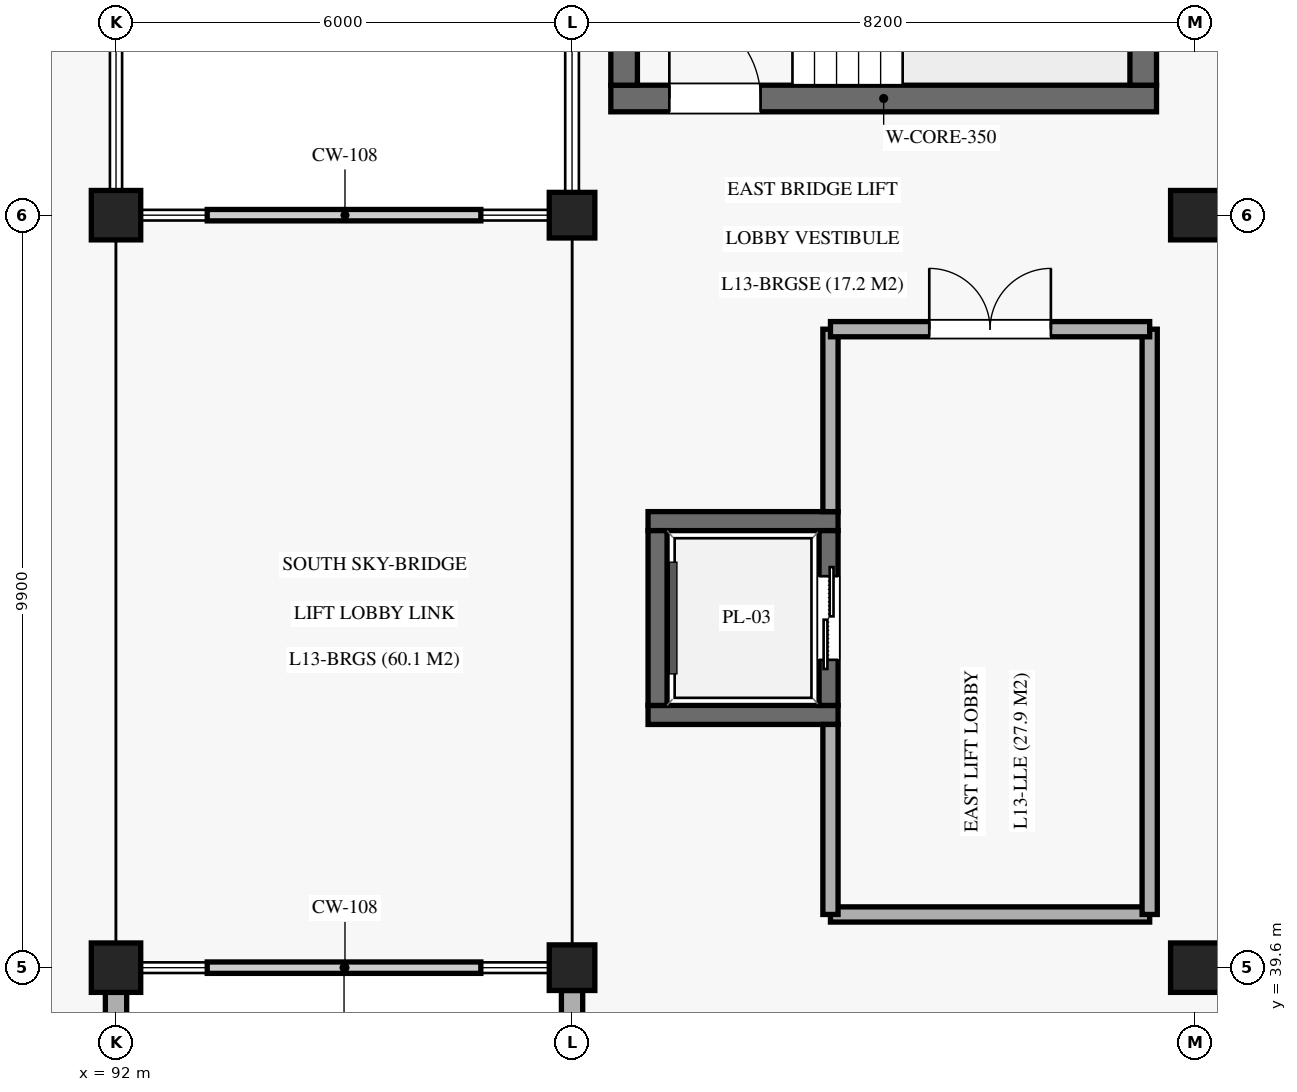
"""IFC4 building model, lengths in metres.
Left out: names, types, materials, properties, quantities, classifications, styles, units other than length and angle.
Written with IfcOpenShell. Run it as: python <this file> out.ifc"""

import sys

from ifc_helpers import new_model, si_unit, direction, frame, frame_2d, origin, origin_2d, place, context, subcontext, project, spatial, rectangle, extrude, element, fill, save


model = new_model("IFC4")
c1 = context("Model", 3, precision=1e-05, world=origin(), true_north=direction((0.0, 1.0)))
c2 = subcontext(c1, "Body", "Model", "MODEL_VIEW")
j1 = project(units=[si_unit("LENGTHUNIT", "METRE"), si_unit("PLANEANGLEUNIT", "RADIAN")], contexts=[c1])
p1 = place(None, origin())
s1 = spatial("IfcSite", under=j1, at=p1, CompositionType="ELEMENT")
p2 = place(p1, origin())
s2 = spatial("IfcBuilding", under=s1, at=p2, CompositionType="ELEMENT")
p3 = place(p2, frame((0.0, 0.0, 66.3)))
s3 = spatial("IfcBuildingStorey", under=s2, at=p3, CompositionType="ELEMENT", Elevation=66.3)
for number, where, z_axis, x_axis in (
    (1, (92.0, 39.6, 0.0), (0.0, 0.0, 1.0), (1.0, 0.0, 0.0)),
    (2, (92.0, 49.5, 0.0), (0.0, 0.0, 1.0), (1.0, 0.0, 0.0)),
):
    element("IfcColumn", number, at=place(p3, frame(where, z_axis=z_axis, x_axis=x_axis)), inside=s3, PredefinedType="COLUMN", context=c2, shape_type="SweptSolid", body=[
        extrude(rectangle(XDim=0.65, YDim=0.65, at=origin_2d()), origin(), (0.0, 0.0, 1.0), 4.08),
    ])
for number, where, z_axis, x_axis in (
    (3, (98.0, 39.6, 0.0), (0.0, 0.0, 1.0), (1.0, 0.0, 0.0)),
    (4, (98.0, 49.5, 0.0), (0.0, 0.0, 1.0), (1.0, 0.0, 0.0)),
):
    element("IfcColumn", number, at=place(p3, frame(where, z_axis=z_axis, x_axis=x_axis)), inside=s3, PredefinedType="COLUMN", context=c2, shape_type="SweptSolid", body=[
        extrude(rectangle(XDim=0.6, YDim=0.6, at=origin_2d()), origin(), (0.0, 0.0, 1.0), 4.08),
    ])
for number, where, z_axis, x_axis in (
    (5, (106.2, 39.6, 0.0), (0.0, 0.0, 1.0), (1.0, 0.0, 0.0)),
    (6, (106.2, 49.5, 0.0), (0.0, 0.0, 1.0), (1.0, 0.0, 0.0)),
):
    element("IfcColumn", number, at=place(p3, frame(where, z_axis=z_axis, x_axis=x_axis)), inside=s3, PredefinedType="COLUMN", context=c2, shape_type="SweptSolid", body=[
        extrude(rectangle(XDim=0.65, YDim=0.65, at=origin_2d()), origin(), (0.0, 0.0, 1.0), 4.08),
    ])
p4 = place(p3, frame((92.0, 30.025, 0.0), z_axis=(0.0, 0.0, 1.0), x_axis=(0.0, 1.0, 0.0)))
e7 = element("IfcWall", 7, at=p4, inside=s3, PredefinedType="SOLIDWALL", context=c2, shape_type="SweptSolid", body=[
    extrude(rectangle(XDim=9.25, YDim=0.28, at=frame_2d((4.625, 0.0))), origin(), (0.0, 0.0, 1.0), 3.08),
])
p5 = place(p4, frame((3.625, 0.0, 1.15)))
e8 = element("IfcOpeningElement", 8, at=p5, cuts=e7, PredefinedType="OPENING", context=c2, shape_type="SweptSolid", body=[
    extrude(rectangle(XDim=1.2, YDim=1.5, at=frame_2d((0.6, 0.75))), frame((0.0, 0.15, 0.0), z_axis=(0.0, -1.0, 0.0), x_axis=(1.0, 0.0, 0.0)), (0.0, 0.0, 1.0), 0.3),
])
p6 = place(p3, frame((98.0, 30.0, 0.0), z_axis=(0.0, 0.0, 1.0), x_axis=(0.0, 1.0, 0.0)))
e9 = element("IfcWall", 9, at=p6, inside=s3, PredefinedType="SOLIDWALL", context=c2, shape_type="SweptSolid", body=[
    extrude(rectangle(XDim=9.3, YDim=0.28, at=frame_2d((4.65, 0.0))), origin(), (0.0, 0.0, 1.0), 3.08),
])
p7 = place(p6, frame((3.65, 0.0, 1.15)))
e10 = element("IfcOpeningElement", 10, at=p7, cuts=e9, PredefinedType="OPENING", context=c2, shape_type="SweptSolid", body=[
    extrude(rectangle(XDim=1.9, YDim=1.45, at=frame_2d((0.95, 0.725))), frame((0.0, 0.15, 0.0), z_axis=(0.0, -1.0, 0.0), x_axis=(1.0, 0.0, 0.0)), (0.0, 0.0, 1.0), 0.3),
])
p8 = place(p3, frame((98.51, 51.035, 0.0), z_axis=(0.0, 0.0, 1.0), x_axis=(1.0, 0.0, 0.0)))
e11 = element("IfcWall", 11, at=p8, inside=s3, PredefinedType="SHEAR", context=c2, shape_type="SweptSolid", body=[
    extrude(rectangle(XDim=7.18, YDim=0.35, at=frame_2d((3.59, 0.0))), origin(), (0.0, 0.0, 1.0), 3.83),
])
p9 = place(p8, frame((0.77, 0.0, 0.0)))
e12 = element("IfcOpeningElement", 12, at=p9, cuts=e11, PredefinedType="OPENING", context=c2, shape_type="SweptSolid", body=[
    extrude(rectangle(XDim=1.2, YDim=2.2, at=frame_2d((0.6, 1.1))), frame((0.0, 0.185, 0.0), z_axis=(0.0, -1.0, 0.0), x_axis=(1.0, 0.0, 0.0)), (0.0, 0.0, 1.0), 0.37),
])
for number, where, z_axis, x_axis in (
    (13, (98.685, 51.21, 0.0), (0.0, 0.0, 1.0), (0.0, 1.0, 0.0)),
    (14, (105.515, 51.21, 0.0), (0.0, 0.0, 1.0), (0.0, 1.0, 0.0)),
):
    element("IfcWall", number, at=place(p3, frame(where, z_axis=z_axis, x_axis=x_axis)), inside=s3, PredefinedType="SHEAR", context=c2, shape_type="SweptSolid", body=[
        extrude(rectangle(XDim=6.48, YDim=0.35, at=frame_2d((3.24, 0.0))), origin(), (0.0, 0.0, 1.0), 3.83),
    ])
for number, where, z_axis, x_axis in (
    (15, (99.0, 42.925, 0.0), (0.0, 0.0, 1.0), (1.0, 0.0, 0.0)),
    (16, (99.0, 45.475, 0.0), (0.0, 0.0, 1.0), (1.0, 0.0, 0.0)),
):
    element("IfcWall", number, at=place(p3, frame(where, z_axis=z_axis, x_axis=x_axis)), inside=s3, PredefinedType="SOLIDWALL", context=c2, shape_type="SweptSolid", body=[
        extrude(rectangle(XDim=2.5, YDim=0.25, at=frame_2d((1.25, 0.0))), origin(), (0.0, 0.0, 1.0), 3.81),
    ])
p10 = place(p3, frame((99.125, 43.05, 0.0), z_axis=(0.0, 0.0, 1.0), x_axis=(0.0, 1.0, 0.0)))
e17 = element("IfcWall", 17, at=p10, inside=s3, PredefinedType="SOLIDWALL", context=c2, shape_type="SweptSolid", body=[
    extrude(rectangle(XDim=2.3, YDim=0.25, at=frame_2d((1.15, 0.0))), origin(), (0.0, 0.0, 1.0), 3.81),
])
p11 = place(p3, frame((101.375, 43.05, 0.0), z_axis=(0.0, 0.0, 1.0), x_axis=(0.0, 1.0, 0.0)))
e18 = element("IfcWall", 18, at=p11, inside=s3, PredefinedType="SOLIDWALL", context=c2, shape_type="SweptSolid", body=[
    extrude(rectangle(XDim=2.3, YDim=0.25, at=frame_2d((1.15, 0.0))), origin(), (0.0, 0.0, 1.0), 3.81),
])
p12 = place(p11, frame((0.6, 0.0, 0.0)))
e19 = element("IfcOpeningElement", 19, at=p12, cuts=e18, PredefinedType="OPENING", context=c2, shape_type="SweptSolid", body=[
    extrude(rectangle(XDim=1.1, YDim=2.2, at=frame_2d((0.55, 1.1))), frame((0.0, 0.135, 0.0), z_axis=(0.0, -1.0, 0.0), x_axis=(1.0, 0.0, 0.0)), (0.0, 0.0, 1.0), 0.27),
])
p13 = place(p3, frame((101.4, 40.3, 0.0), z_axis=(0.0, 0.0, 1.0), x_axis=(1.0, 0.0, 0.0)))
e20 = element("IfcWall", 20, at=p13, inside=s3, PredefinedType="SOLIDWALL", context=c2, shape_type="SweptSolid", body=[
    extrude(rectangle(XDim=4.2, YDim=0.2, at=frame_2d((2.1, 0.0))), origin(), (0.0, 0.0, 1.0), 2.95),
])
p14 = place(p3, frame((101.4, 40.3, 0.0), z_axis=(0.0, 0.0, 1.0), x_axis=(0.0, 1.0, 0.0)))
e21 = element("IfcWall", 21, at=p14, inside=s3, PredefinedType="SOLIDWALL", context=c2, shape_type="SweptSolid", body=[
    extrude(rectangle(XDim=2.5, YDim=0.2, at=frame_2d((1.25, 0.0))), origin(), (0.0, 0.0, 1.0), 2.95),
])
p15 = place(p3, frame((101.4, 45.6, 0.0), z_axis=(0.0, 0.0, 1.0), x_axis=(0.0, 1.0, 0.0)))
e22 = element("IfcWall", 22, at=p15, inside=s3, PredefinedType="SOLIDWALL", context=c2, shape_type="SweptSolid", body=[
    extrude(rectangle(XDim=2.4, YDim=0.2, at=frame_2d((1.2, 0.0))), origin(), (0.0, 0.0, 1.0), 2.95),
])
p16 = place(p3, frame((105.6, 40.3, 0.0), z_axis=(0.0, 0.0, 1.0), x_axis=(0.0, 1.0, 0.0)))
e23 = element("IfcWall", 23, at=p16, inside=s3, PredefinedType="SOLIDWALL", context=c2, shape_type="SweptSolid", body=[
    extrude(rectangle(XDim=7.7, YDim=0.2, at=frame_2d((3.85, 0.0))), origin(), (0.0, 0.0, 1.0), 2.95),
])
p17 = place(p3, frame((101.4, 48.0, 0.0), z_axis=(0.0, 0.0, 1.0), x_axis=(1.0, 0.0, 0.0)))
e24 = element("IfcWall", 24, at=p17, inside=s3, PredefinedType="SOLIDWALL", context=c2, shape_type="SweptSolid", body=[
    extrude(rectangle(XDim=4.2, YDim=0.2, at=frame_2d((2.1, 0.0))), origin(), (0.0, 0.0, 1.0), 2.95),
])
p18 = place(p17, frame((1.3, 0.0, 0.0)))
e25 = element("IfcOpeningElement", 25, at=p18, cuts=e24, PredefinedType="OPENING", context=c2, shape_type="SweptSolid", body=[
    extrude(rectangle(XDim=1.6, YDim=2.2, at=frame_2d((0.8, 1.1))), frame((0.0, 0.11, 0.0), z_axis=(0.0, -1.0, 0.0), x_axis=(1.0, 0.0, 0.0)), (0.0, 0.0, 1.0), 0.22),
])
p19 = place(p9, origin())
e26 = element("IfcDoor", 26, at=p19, inside=s3, OperationType="SINGLE_SWING_LEFT", PredefinedType="DOOR", context=c2, shape_type="SweptSolid", body=[
    extrude(rectangle(XDim=1.2, YDim=2.2, at=frame_2d((0.6, 1.1))), frame((0.0, 0.025, 0.0), z_axis=(0.0, -1.0, 0.0), x_axis=(1.0, 0.0, 0.0)), (0.0, 0.0, 1.0), 0.05),
])
fill(e12, e26)
p20 = place(p12, origin())
e27 = element("IfcDoor", 27, at=p20, inside=s3, OperationType="DOUBLE_DOOR_SLIDING", PredefinedType="DOOR", context=c2, shape_type="SweptSolid", body=[
    extrude(rectangle(XDim=1.1, YDim=2.2, at=frame_2d((0.55, 1.1))), frame((0.0, 0.025, 0.0), z_axis=(0.0, -1.0, 0.0), x_axis=(1.0, 0.0, 0.0)), (0.0, 0.0, 1.0), 0.05),
])
fill(e19, e27)
p21 = place(p18, origin())
e28 = element("IfcDoor", 28, at=p21, inside=s3, OperationType="DOUBLE_DOOR_SINGLE_SWING", PredefinedType="DOOR", context=c2, shape_type="SweptSolid", body=[
    extrude(rectangle(XDim=1.6, YDim=2.2, at=frame_2d((0.8, 1.1))), frame((0.0, 0.025, 0.0), z_axis=(0.0, -1.0, 0.0), x_axis=(1.0, 0.0, 0.0)), (0.0, 0.0, 1.0), 0.05),
])
fill(e25, e28)
save(model, sys.argv[1])
